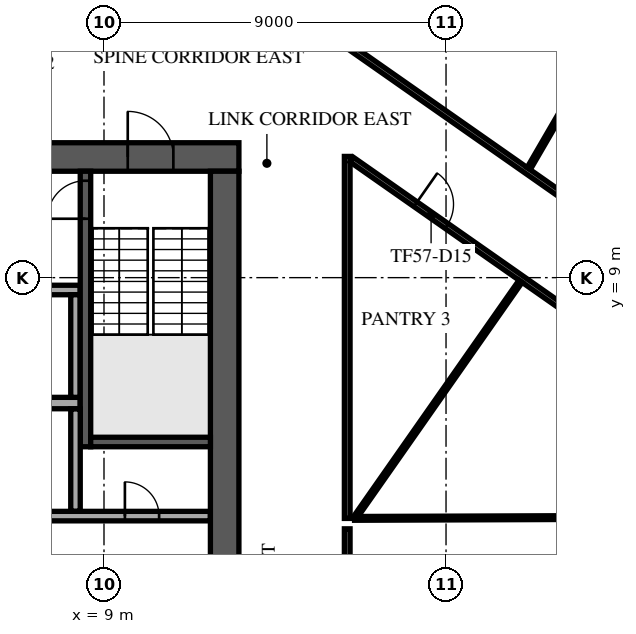
"""IFC4 building model, lengths in metres.
Left out: names, types, materials, properties, quantities, classifications, styles, units other than length and angle.
Written with IfcOpenShell. Run it as: python <this file> out.ifc"""

import sys

from ifc_helpers import new_model, si_unit, direction, frame, frame_2d, origin, place, context, subcontext, project, spatial, rectangle, extrude, element, fill, save


model = new_model("IFC4")
c1 = context("Model", 3, precision=1e-05, world=origin(), true_north=direction((0.0, 1.0)))
c2 = subcontext(c1, "Body", "Model", "MODEL_VIEW")
j1 = project(units=[si_unit("LENGTHUNIT", "METRE"), si_unit("PLANEANGLEUNIT", "RADIAN")], contexts=[c1])
p1 = place(None, origin())
s1 = spatial("IfcSite", under=j1, at=p1, CompositionType="ELEMENT")
p2 = place(p1, origin())
s2 = spatial("IfcBuilding", under=s1, at=p2, CompositionType="ELEMENT")
p3 = place(p2, frame((0.0, 0.0, 242.9)))
s3 = spatial("IfcBuildingStorey", under=s2, at=p3, CompositionType="ELEMENT", Elevation=242.9)
p4 = place(p3, frame((-12.55, 12.175, 0.0), z_axis=(0.0, 0.0, 1.0), x_axis=(1.0, 0.0, 0.0)))
e1 = element("IfcWall", 1, at=p4, inside=s3, PredefinedType="SHEAR", context=c2, shape_type="SweptSolid", body=[
    extrude(rectangle(XDim=25.1, YDim=0.75, at=frame_2d((12.55, 0.0))), origin(), (0.0, 0.0, 1.0), 3.64),
])
p5 = place(p4, frame((11.35, 0.0, 0.0)))
e2 = element("IfcOpeningElement", 2, at=p5, cuts=e1, PredefinedType="OPENING", context=c2, shape_type="SweptSolid", body=[
    extrude(rectangle(XDim=2.4, YDim=2.4, at=frame_2d((1.2, 1.2))), frame((0.0, 0.385, 0.0), z_axis=(0.0, -1.0, 0.0), x_axis=(1.0, 0.0, 0.0)), (0.0, 0.0, 1.0), 0.77),
])
p6 = place(p4, frame((22.175, 0.0, 0.0)))
e3 = element("IfcOpeningElement", 3, at=p6, cuts=e1, PredefinedType="OPENING", context=c2, shape_type="SweptSolid", body=[
    extrude(rectangle(XDim=1.2, YDim=2.1, at=frame_2d((0.6, 1.05))), frame((0.0, 0.385, 0.0), z_axis=(0.0, -1.0, 0.0), x_axis=(1.0, 0.0, 0.0)), (0.0, 0.0, 1.0), 0.77),
])
p7 = place(p4, frame((1.15, 0.0, 0.0)))
e4 = element("IfcOpeningElement", 4, at=p7, cuts=e1, PredefinedType="OPENING", context=c2, shape_type="SweptSolid", body=[
    extrude(rectangle(XDim=1.0, YDim=2.1, at=frame_2d((0.5, 1.05))), frame((0.0, 0.385, 0.0), z_axis=(0.0, -1.0, 0.0), x_axis=(1.0, 0.0, 0.0)), (0.0, 0.0, 1.0), 0.77),
])
p8 = place(p3, frame((12.175, -11.8, 0.0), z_axis=(0.0, 0.0, 1.0), x_axis=(0.0, 1.0, 0.0)))
e5 = element("IfcWall", 5, at=p8, inside=s3, PredefinedType="SHEAR", context=c2, shape_type="SweptSolid", body=[
    extrude(rectangle(XDim=23.6, YDim=0.75, at=frame_2d((11.8, 0.0))), origin(), (0.0, 0.0, 1.0), 3.64),
])
p9 = place(p8, frame((10.6, 0.0, 0.0)))
e6 = element("IfcOpeningElement", 6, at=p9, cuts=e5, PredefinedType="OPENING", context=c2, shape_type="SweptSolid", body=[
    extrude(rectangle(XDim=2.4, YDim=2.4, at=frame_2d((1.2, 1.2))), frame((0.0, 0.385, 0.0), z_axis=(0.0, -1.0, 0.0), x_axis=(1.0, 0.0, 0.0)), (0.0, 0.0, 1.0), 0.77),
])
p10 = place(p3, frame((-8.375, 5.7, 0.0), z_axis=(0.0, 0.0, 1.0), x_axis=(1.0, 0.0, 0.0)))
e7 = element("IfcWall", 7, at=p10, inside=s3, PredefinedType="SOLIDWALL", context=c2, shape_type="SweptSolid", body=[
    extrude(rectangle(XDim=16.75, YDim=0.3, at=frame_2d((8.375, 0.0))), origin(), (0.0, 0.0, 1.0), 3.64),
])
p11 = place(p3, frame((-8.375, 8.675, 0.0), z_axis=(0.0, 0.0, 1.0), x_axis=(1.0, 0.0, 0.0)))
e8 = element("IfcWall", 8, at=p11, inside=s3, PredefinedType="SOLIDWALL", context=c2, shape_type="SweptSolid", body=[
    extrude(rectangle(XDim=16.75, YDim=0.25, at=frame_2d((8.375, 0.0))), origin(), (0.0, 0.0, 1.0), 3.64),
])
p12 = place(p11, frame((0.9, 0.0, 0.0)))
e9 = element("IfcOpeningElement", 9, at=p12, cuts=e8, PredefinedType="OPENING", context=c2, shape_type="SweptSolid", body=[
    extrude(rectangle(XDim=1.2, YDim=2.1, at=frame_2d((0.6, 1.05))), frame((0.0, 0.135, 0.0), z_axis=(0.0, -1.0, 0.0), x_axis=(1.0, 0.0, 0.0)), (0.0, 0.0, 1.0), 0.27),
])
p13 = place(p11, frame((3.65, 0.0, 0.0)))
e10 = element("IfcOpeningElement", 10, at=p13, cuts=e8, PredefinedType="OPENING", context=c2, shape_type="SweptSolid", body=[
    extrude(rectangle(XDim=1.2, YDim=2.1, at=frame_2d((0.6, 1.05))), frame((0.0, 0.135, 0.0), z_axis=(0.0, -1.0, 0.0), x_axis=(1.0, 0.0, 0.0)), (0.0, 0.0, 1.0), 0.27),
])
p14 = place(p11, frame((6.4, 0.0, 0.0)))
e11 = element("IfcOpeningElement", 11, at=p14, cuts=e8, PredefinedType="OPENING", context=c2, shape_type="SweptSolid", body=[
    extrude(rectangle(XDim=1.2, YDim=2.1, at=frame_2d((0.6, 1.05))), frame((0.0, 0.135, 0.0), z_axis=(0.0, -1.0, 0.0), x_axis=(1.0, 0.0, 0.0)), (0.0, 0.0, 1.0), 0.27),
])
p15 = place(p11, frame((9.15, 0.0, 0.0)))
e12 = element("IfcOpeningElement", 12, at=p15, cuts=e8, PredefinedType="OPENING", context=c2, shape_type="SweptSolid", body=[
    extrude(rectangle(XDim=1.2, YDim=2.1, at=frame_2d((0.6, 1.05))), frame((0.0, 0.135, 0.0), z_axis=(0.0, -1.0, 0.0), x_axis=(1.0, 0.0, 0.0)), (0.0, 0.0, 1.0), 0.27),
])
p16 = place(p11, frame((11.9, 0.0, 0.0)))
e13 = element("IfcOpeningElement", 13, at=p16, cuts=e8, PredefinedType="OPENING", context=c2, shape_type="SweptSolid", body=[
    extrude(rectangle(XDim=1.2, YDim=2.1, at=frame_2d((0.6, 1.05))), frame((0.0, 0.135, 0.0), z_axis=(0.0, -1.0, 0.0), x_axis=(1.0, 0.0, 0.0)), (0.0, 0.0, 1.0), 0.27),
])
p17 = place(p11, frame((14.65, 0.0, 0.0)))
e14 = element("IfcOpeningElement", 14, at=p17, cuts=e8, PredefinedType="OPENING", context=c2, shape_type="SweptSolid", body=[
    extrude(rectangle(XDim=1.2, YDim=2.1, at=frame_2d((0.6, 1.05))), frame((0.0, 0.135, 0.0), z_axis=(0.0, -1.0, 0.0), x_axis=(1.0, 0.0, 0.0)), (0.0, 0.0, 1.0), 0.27),
])
p18 = place(p3, frame((8.25, 5.85, 0.0), z_axis=(0.0, 0.0, 1.0), x_axis=(0.0, 1.0, 0.0)))
e15 = element("IfcWall", 15, at=p18, inside=s3, PredefinedType="SOLIDWALL", context=c2, shape_type="SweptSolid", body=[
    extrude(rectangle(XDim=2.7, YDim=0.25, at=frame_2d((1.35, 0.0))), origin(), (0.0, 0.0, 1.0), 3.64),
])
p19 = place(p3, frame((8.512, 4.55, 0.0), z_axis=(0.0, 0.0, 1.0), x_axis=(0.0, 1.0, 0.0)))
e16 = element("IfcWall", 16, at=p19, inside=s3, PredefinedType="SOLIDWALL", context=c2, shape_type="SweptSolid", body=[
    extrude(rectangle(XDim=7.25, YDim=0.275, at=frame_2d((3.625, 0.0))), origin(), (0.0, 0.0, 1.0), 3.64),
])
p20 = place(p19, frame((6.0, 0.0, 0.0)))
e17 = element("IfcOpeningElement", 17, at=p20, cuts=e16, PredefinedType="OPENING", context=c2, shape_type="SweptSolid", body=[
    extrude(rectangle(XDim=1.0, YDim=2.1, at=frame_2d((0.5, 1.05))), frame((0.0, 0.147, 0.0), z_axis=(0.0, -1.0, 0.0), x_axis=(1.0, 0.0, 0.0)), (0.0, 0.0, 1.0), 0.295),
])
p21 = place(p3, frame((8.65, 4.675, 0.0), z_axis=(0.0, 0.0, 1.0), x_axis=(1.0, 0.0, 0.0)))
e18 = element("IfcWall", 18, at=p21, inside=s3, PredefinedType="SOLIDWALL", context=c2, shape_type="SweptSolid", body=[
    extrude(rectangle(XDim=3.15, YDim=0.25, at=frame_2d((1.575, 0.0))), origin(), (0.0, 0.0, 1.0), 3.64),
])
p22 = place(p3, frame((-11.795, 2.725, 0.0), z_axis=(0.0, 0.0, 1.0), x_axis=(1.0, 0.0, 0.0)))
e19 = element("IfcWall", 19, at=p22, inside=s3, PredefinedType="PARTITIONING", context=c2, shape_type="SweptSolid", body=[
    extrude(rectangle(XDim=23.59, YDim=0.25, at=frame_2d((11.795, 0.0))), origin(), (0.0, 0.0, 1.0), 3.64),
])
p23 = place(p22, frame((21.345, 0.0, 0.0)))
e20 = element("IfcOpeningElement", 20, at=p23, cuts=e19, PredefinedType="OPENING", context=c2, shape_type="SweptSolid", body=[
    extrude(rectangle(XDim=0.9, YDim=2.1, at=frame_2d((0.45, 1.05))), frame((0.0, 0.135, 0.0), z_axis=(0.0, -1.0, 0.0), x_axis=(1.0, 0.0, 0.0)), (0.0, 0.0, 1.0), 0.27),
])
p24 = place(p22, frame((1.345, 0.0, 0.0)))
e21 = element("IfcOpeningElement", 21, at=p24, cuts=e19, PredefinedType="OPENING", context=c2, shape_type="SweptSolid", body=[
    extrude(rectangle(XDim=0.9, YDim=2.1, at=frame_2d((0.45, 1.05))), frame((0.0, 0.135, 0.0), z_axis=(0.0, -1.0, 0.0), x_axis=(1.0, 0.0, 0.0)), (0.0, 0.0, 1.0), 0.27),
])
p25 = place(p22, frame((4.42, 0.0, 0.0)))
e22 = element("IfcOpeningElement", 22, at=p25, cuts=e19, PredefinedType="OPENING", context=c2, shape_type="SweptSolid", body=[
    extrude(rectangle(XDim=1.0, YDim=2.1, at=frame_2d((0.5, 1.05))), frame((0.0, 0.135, 0.0), z_axis=(0.0, -1.0, 0.0), x_axis=(1.0, 0.0, 0.0)), (0.0, 0.0, 1.0), 0.27),
])
p26 = place(p22, frame((7.17, 0.0, 0.0)))
e23 = element("IfcOpeningElement", 23, at=p26, cuts=e19, PredefinedType="OPENING", context=c2, shape_type="SweptSolid", body=[
    extrude(rectangle(XDim=1.0, YDim=2.1, at=frame_2d((0.5, 1.05))), frame((0.0, 0.135, 0.0), z_axis=(0.0, -1.0, 0.0), x_axis=(1.0, 0.0, 0.0)), (0.0, 0.0, 1.0), 0.27),
])
p27 = place(p22, frame((12.57, 0.0, 0.0)))
e24 = element("IfcOpeningElement", 24, at=p27, cuts=e19, PredefinedType="OPENING", context=c2, shape_type="SweptSolid", body=[
    extrude(rectangle(XDim=1.2, YDim=2.1, at=frame_2d((0.6, 1.05))), frame((0.0, 0.135, 0.0), z_axis=(0.0, -1.0, 0.0), x_axis=(1.0, 0.0, 0.0)), (0.0, 0.0, 1.0), 0.27),
])
p28 = place(p3, frame((8.25, 2.855, 0.0), z_axis=(0.0, 0.0, 1.0), x_axis=(0.0, 1.0, 0.0)))
e25 = element("IfcWall", 25, at=p28, inside=s3, PredefinedType="PARTITIONING", context=c2, shape_type="SweptSolid", body=[
    extrude(rectangle(XDim=2.69, YDim=0.25, at=frame_2d((1.345, 0.0))), origin(), (0.0, 0.0, 1.0), 3.64),
])
p29 = place(p3, frame((5.206, -33.362, 0.0), z_axis=(0.0, 0.0, 1.0), x_axis=(0.573577438409, 0.81915134264, 0.0)))
e26 = element("IfcWall", 26, at=p29, inside=s3, PredefinedType="STANDARD", context=c2, shape_type="SweptSolid", body=[
    extrude(rectangle(XDim=48.686, YDim=0.6, at=frame_2d((24.343, 0.0))), origin(), (0.0, 0.0, 1.0), 3.64),
])
p30 = place(p29, frame((1.213, 0.0, 0.9)))
e27 = element("IfcOpeningElement", 27, at=p30, cuts=e26, PredefinedType="OPENING", context=c2, shape_type="SweptSolid", body=[
    extrude(rectangle(XDim=2.0, YDim=2.1, at=frame_2d((1.0, 1.05))), frame((0.0, 0.31, 0.0), z_axis=(0.0, -1.0, 0.0), x_axis=(1.0, 0.0, 0.0)), (0.0, 0.0, 1.0), 0.62),
])
p31 = place(p29, frame((5.639, 0.0, 0.9)))
e28 = element("IfcOpeningElement", 28, at=p31, cuts=e26, PredefinedType="OPENING", context=c2, shape_type="SweptSolid", body=[
    extrude(rectangle(XDim=2.0, YDim=2.1, at=frame_2d((1.0, 1.05))), frame((0.0, 0.31, 0.0), z_axis=(0.0, -1.0, 0.0), x_axis=(1.0, 0.0, 0.0)), (0.0, 0.0, 1.0), 0.62),
])
p32 = place(p29, frame((10.065, 0.0, 0.9)))
e29 = element("IfcOpeningElement", 29, at=p32, cuts=e26, PredefinedType="OPENING", context=c2, shape_type="SweptSolid", body=[
    extrude(rectangle(XDim=2.0, YDim=2.1, at=frame_2d((1.0, 1.05))), frame((0.0, 0.31, 0.0), z_axis=(0.0, -1.0, 0.0), x_axis=(1.0, 0.0, 0.0)), (0.0, 0.0, 1.0), 0.62),
])
p33 = place(p29, frame((14.491, 0.0, 0.9)))
e30 = element("IfcOpeningElement", 30, at=p33, cuts=e26, PredefinedType="OPENING", context=c2, shape_type="SweptSolid", body=[
    extrude(rectangle(XDim=2.0, YDim=2.1, at=frame_2d((1.0, 1.05))), frame((0.0, 0.31, 0.0), z_axis=(0.0, -1.0, 0.0), x_axis=(1.0, 0.0, 0.0)), (0.0, 0.0, 1.0), 0.62),
])
p34 = place(p29, frame((18.917, 0.0, 0.9)))
e31 = element("IfcOpeningElement", 31, at=p34, cuts=e26, PredefinedType="OPENING", context=c2, shape_type="SweptSolid", body=[
    extrude(rectangle(XDim=2.0, YDim=2.1, at=frame_2d((1.0, 1.05))), frame((0.0, 0.31, 0.0), z_axis=(0.0, -1.0, 0.0), x_axis=(1.0, 0.0, 0.0)), (0.0, 0.0, 1.0), 0.62),
])
p35 = place(p29, frame((23.343, 0.0, 0.9)))
e32 = element("IfcOpeningElement", 32, at=p35, cuts=e26, PredefinedType="OPENING", context=c2, shape_type="SweptSolid", body=[
    extrude(rectangle(XDim=2.0, YDim=2.1, at=frame_2d((1.0, 1.05))), frame((0.0, 0.31, 0.0), z_axis=(0.0, -1.0, 0.0), x_axis=(1.0, 0.0, 0.0)), (0.0, 0.0, 1.0), 0.62),
])
p36 = place(p29, frame((27.769, 0.0, 0.9)))
e33 = element("IfcOpeningElement", 33, at=p36, cuts=e26, PredefinedType="OPENING", context=c2, shape_type="SweptSolid", body=[
    extrude(rectangle(XDim=2.0, YDim=2.1, at=frame_2d((1.0, 1.05))), frame((0.0, 0.31, 0.0), z_axis=(0.0, -1.0, 0.0), x_axis=(1.0, 0.0, 0.0)), (0.0, 0.0, 1.0), 0.62),
])
p37 = place(p29, frame((32.195, 0.0, 0.9)))
e34 = element("IfcOpeningElement", 34, at=p37, cuts=e26, PredefinedType="OPENING", context=c2, shape_type="SweptSolid", body=[
    extrude(rectangle(XDim=2.0, YDim=2.1, at=frame_2d((1.0, 1.05))), frame((0.0, 0.31, 0.0), z_axis=(0.0, -1.0, 0.0), x_axis=(1.0, 0.0, 0.0)), (0.0, 0.0, 1.0), 0.62),
])
p38 = place(p29, frame((36.621, 0.0, 0.9)))
e35 = element("IfcOpeningElement", 35, at=p38, cuts=e26, PredefinedType="OPENING", context=c2, shape_type="SweptSolid", body=[
    extrude(rectangle(XDim=2.0, YDim=2.1, at=frame_2d((1.0, 1.05))), frame((0.0, 0.31, 0.0), z_axis=(0.0, -1.0, 0.0), x_axis=(1.0, 0.0, 0.0)), (0.0, 0.0, 1.0), 0.62),
])
p39 = place(p29, frame((41.047, 0.0, 0.9)))
e36 = element("IfcOpeningElement", 36, at=p39, cuts=e26, PredefinedType="OPENING", context=c2, shape_type="SweptSolid", body=[
    extrude(rectangle(XDim=2.0, YDim=2.1, at=frame_2d((1.0, 1.05))), frame((0.0, 0.31, 0.0), z_axis=(0.0, -1.0, 0.0), x_axis=(1.0, 0.0, 0.0)), (0.0, 0.0, 1.0), 0.62),
])
p40 = place(p29, frame((45.473, 0.0, 0.9)))
e37 = element("IfcOpeningElement", 37, at=p40, cuts=e26, PredefinedType="OPENING", context=c2, shape_type="SweptSolid", body=[
    extrude(rectangle(XDim=2.0, YDim=2.1, at=frame_2d((1.0, 1.05))), frame((0.0, 0.31, 0.0), z_axis=(0.0, -1.0, 0.0), x_axis=(1.0, 0.0, 0.0)), (0.0, 0.0, 1.0), 0.62),
])
p41 = place(p3, frame((31.815, 13.98, 0.0), z_axis=(0.0, 0.0, 1.0), x_axis=(-0.819152162902, 0.573576266955, 0.0)))
e38 = element("IfcWall", 38, at=p41, inside=s3, PredefinedType="STANDARD", context=c2, shape_type="SweptSolid", body=[
    extrude(rectangle(XDim=36.243, YDim=0.6, at=frame_2d((18.122, 0.0))), origin(), (0.0, 0.0, 1.0), 3.64),
])
p42 = place(p41, frame((1.215, 0.0, 0.9)))
e39 = element("IfcOpeningElement", 39, at=p42, cuts=e38, PredefinedType="OPENING", context=c2, shape_type="SweptSolid", body=[
    extrude(rectangle(XDim=2.1, YDim=2.1, at=frame_2d((1.05, 1.05))), frame((0.0, 0.31, 0.0), z_axis=(0.0, -1.0, 0.0), x_axis=(1.0, 0.0, 0.0)), (0.0, 0.0, 1.0), 0.62),
])
p43 = place(p41, frame((5.746, 0.0, 0.9)))
e40 = element("IfcOpeningElement", 40, at=p43, cuts=e38, PredefinedType="OPENING", context=c2, shape_type="SweptSolid", body=[
    extrude(rectangle(XDim=2.1, YDim=2.1, at=frame_2d((1.05, 1.05))), frame((0.0, 0.31, 0.0), z_axis=(0.0, -1.0, 0.0), x_axis=(1.0, 0.0, 0.0)), (0.0, 0.0, 1.0), 0.62),
])
p44 = place(p41, frame((10.276, 0.0, 0.9)))
e41 = element("IfcOpeningElement", 41, at=p44, cuts=e38, PredefinedType="OPENING", context=c2, shape_type="SweptSolid", body=[
    extrude(rectangle(XDim=2.1, YDim=2.1, at=frame_2d((1.05, 1.05))), frame((0.0, 0.31, 0.0), z_axis=(0.0, -1.0, 0.0), x_axis=(1.0, 0.0, 0.0)), (0.0, 0.0, 1.0), 0.62),
])
p45 = place(p41, frame((14.806, 0.0, 0.9)))
e42 = element("IfcOpeningElement", 42, at=p45, cuts=e38, PredefinedType="OPENING", context=c2, shape_type="SweptSolid", body=[
    extrude(rectangle(XDim=2.1, YDim=2.1, at=frame_2d((1.05, 1.05))), frame((0.0, 0.31, 0.0), z_axis=(0.0, -1.0, 0.0), x_axis=(1.0, 0.0, 0.0)), (0.0, 0.0, 1.0), 0.62),
])
p46 = place(p41, frame((19.337, 0.0, 0.9)))
e43 = element("IfcOpeningElement", 43, at=p46, cuts=e38, PredefinedType="OPENING", context=c2, shape_type="SweptSolid", body=[
    extrude(rectangle(XDim=2.1, YDim=2.1, at=frame_2d((1.05, 1.05))), frame((0.0, 0.31, 0.0), z_axis=(0.0, -1.0, 0.0), x_axis=(1.0, 0.0, 0.0)), (0.0, 0.0, 1.0), 0.62),
])
p47 = place(p41, frame((23.867, 0.0, 0.9)))
e44 = element("IfcOpeningElement", 44, at=p47, cuts=e38, PredefinedType="OPENING", context=c2, shape_type="SweptSolid", body=[
    extrude(rectangle(XDim=2.1, YDim=2.1, at=frame_2d((1.05, 1.05))), frame((0.0, 0.31, 0.0), z_axis=(0.0, -1.0, 0.0), x_axis=(1.0, 0.0, 0.0)), (0.0, 0.0, 1.0), 0.62),
])
p48 = place(p41, frame((28.398, 0.0, 0.9)))
e45 = element("IfcOpeningElement", 45, at=p48, cuts=e38, PredefinedType="OPENING", context=c2, shape_type="SweptSolid", body=[
    extrude(rectangle(XDim=2.1, YDim=2.1, at=frame_2d((1.05, 1.05))), frame((0.0, 0.31, 0.0), z_axis=(0.0, -1.0, 0.0), x_axis=(1.0, 0.0, 0.0)), (0.0, 0.0, 1.0), 0.62),
])
p49 = place(p41, frame((32.928, 0.0, 0.9)))
e46 = element("IfcOpeningElement", 46, at=p49, cuts=e38, PredefinedType="OPENING", context=c2, shape_type="SweptSolid", body=[
    extrude(rectangle(XDim=2.1, YDim=2.1, at=frame_2d((1.05, 1.05))), frame((0.0, 0.31, 0.0), z_axis=(0.0, -1.0, 0.0), x_axis=(1.0, 0.0, 0.0)), (0.0, 0.0, 1.0), 0.62),
])
p50 = place(p3, frame((-1.89, 27.226, 0.0), z_axis=(0.0, 0.0, 1.0), x_axis=(0.819163235761, -0.573560452941, 0.0)))
e47 = element("IfcWall", 47, at=p50, inside=s3, PredefinedType="PARTITIONING", context=c2, shape_type="SweptSolid", body=[
    extrude(rectangle(XDim=34.403, YDim=0.15, at=frame_2d((17.202, 0.0))), origin(), (0.0, 0.0, 1.0), 3.24),
])
p51 = place(p50, frame((7.427, 0.0, 0.0)))
e48 = element("IfcOpeningElement", 48, at=p51, cuts=e47, PredefinedType="OPENING", context=c2, shape_type="SweptSolid", body=[
    extrude(rectangle(XDim=1.0, YDim=2.1, at=frame_2d((0.5, 1.05))), frame((0.0, 0.085, 0.0), z_axis=(0.0, -1.0, 0.0), x_axis=(1.0, 0.0, 0.0)), (0.0, 0.0, 1.0), 0.17),
])
p52 = place(p50, frame((15.173, 0.0, 0.0)))
e49 = element("IfcOpeningElement", 49, at=p52, cuts=e47, PredefinedType="OPENING", context=c2, shape_type="SweptSolid", body=[
    extrude(rectangle(XDim=1.0, YDim=2.1, at=frame_2d((0.5, 1.05))), frame((0.0, 0.085, 0.0), z_axis=(0.0, -1.0, 0.0), x_axis=(1.0, 0.0, 0.0)), (0.0, 0.0, 1.0), 0.17),
])
p53 = place(p50, frame((19.273, 0.0, 0.0)))
e50 = element("IfcOpeningElement", 50, at=p53, cuts=e47, PredefinedType="OPENING", context=c2, shape_type="SweptSolid", body=[
    extrude(rectangle(XDim=1.0, YDim=2.1, at=frame_2d((0.5, 1.05))), frame((0.0, 0.085, 0.0), z_axis=(0.0, -1.0, 0.0), x_axis=(1.0, 0.0, 0.0)), (0.0, 0.0, 1.0), 0.17),
])
p54 = place(p3, frame((15.4, -15.325, 0.0), z_axis=(0.0, 0.0, 1.0), x_axis=(0.0, 1.0, 0.0)))
e51 = element("IfcWall", 51, at=p54, inside=s3, PredefinedType="PARTITIONING", context=c2, shape_type="SweptSolid", body=[
    extrude(rectangle(XDim=17.715, YDim=0.15, at=frame_2d((8.857, 0.0))), origin(), (0.0, 0.0, 1.0), 3.24),
])
p55 = place(p54, frame((7.812, 0.0, 0.0)))
e52 = element("IfcOpeningElement", 52, at=p55, cuts=e51, PredefinedType="OPENING", context=c2, shape_type="SweptSolid", body=[
    extrude(rectangle(XDim=1.0, YDim=2.1, at=frame_2d((0.5, 1.05))), frame((0.0, 0.085, 0.0), z_axis=(0.0, -1.0, 0.0), x_axis=(1.0, 0.0, 0.0)), (0.0, 0.0, 1.0), 0.17),
])
p56 = place(p54, frame((15.123, 0.0, 0.0)))
e53 = element("IfcOpeningElement", 53, at=p56, cuts=e51, PredefinedType="OPENING", context=c2, shape_type="SweptSolid", body=[
    extrude(rectangle(XDim=1.0, YDim=2.1, at=frame_2d((0.5, 1.05))), frame((0.0, 0.085, 0.0), z_axis=(0.0, -1.0, 0.0), x_axis=(1.0, 0.0, 0.0)), (0.0, 0.0, 1.0), 0.17),
])
p57 = place(p3, frame((15.4, 2.664, 0.0), z_axis=(0.0, 0.0, 1.0), x_axis=(0.0, 1.0, 0.0)))
e54 = element("IfcWall", 54, at=p57, inside=s3, PredefinedType="PARTITIONING", context=c2, shape_type="SweptSolid", body=[
    extrude(rectangle(XDim=9.526, YDim=0.15, at=frame_2d((4.763, 0.0))), origin(), (0.0, 0.0, 1.0), 3.24),
])
p58 = place(p3, frame((15.518, 12.107, 0.0), z_axis=(0.0, 0.0, 1.0), x_axis=(0.819171924474, -0.573548043457, 0.0)))
e55 = element("IfcWall", 55, at=p58, inside=s3, PredefinedType="PARTITIONING", context=c2, shape_type="SweptSolid", body=[
    extrude(rectangle(XDim=11.471, YDim=0.15, at=frame_2d((5.736, 0.0))), origin(), (0.0, 0.0, 1.0), 3.24),
])
p59 = place(p58, frame((2.05, 0.0, 0.0)))
e56 = element("IfcOpeningElement", 56, at=p59, cuts=e55, PredefinedType="OPENING", context=c2, shape_type="SweptSolid", body=[
    extrude(rectangle(XDim=1.0, YDim=2.1, at=frame_2d((0.5, 1.05))), frame((0.0, 0.085, 0.0), z_axis=(0.0, -1.0, 0.0), x_axis=(1.0, 0.0, 0.0)), (0.0, 0.0, 1.0), 0.17),
])
p60 = place(p58, frame((10.027, 0.0, 0.0)))
e57 = element("IfcOpeningElement", 57, at=p60, cuts=e55, PredefinedType="OPENING", context=c2, shape_type="SweptSolid", body=[
    extrude(rectangle(XDim=1.0, YDim=2.1, at=frame_2d((0.5, 1.05))), frame((0.0, 0.085, 0.0), z_axis=(0.0, -1.0, 0.0), x_axis=(1.0, 0.0, 0.0)), (0.0, 0.0, 1.0), 0.17),
])
p61 = place(p3, frame((15.593, 2.665, 0.0), z_axis=(0.0, 0.0, 1.0), x_axis=(0.999993270933, 0.003668526741, 0.0)))
e58 = element("IfcWall", 58, at=p61, inside=s3, PredefinedType="PARTITIONING", context=c2, shape_type="SweptSolid", body=[
    extrude(rectangle(XDim=14.508, YDim=0.1, at=frame_2d((7.254, 0.0))), origin(), (0.0, 0.0, 1.0), 3.64),
])
p62 = place(p3, frame((15.648, 2.744, 0.0), z_axis=(0.0, 0.0, 1.0), x_axis=(0.57357562998, 0.819152608915, 0.0)))
e59 = element("IfcWall", 59, at=p62, inside=s3, PredefinedType="PARTITIONING", context=c2, shape_type="SweptSolid", body=[
    extrude(rectangle(XDim=7.521, YDim=0.1, at=frame_2d((3.76, 0.0))), origin(), (0.0, 0.0, 1.0), 3.24),
])
p63 = place(p3, frame((20.177, 11.873, 0.0), z_axis=(0.0, 0.0, 1.0), x_axis=(0.502475319919, 0.864591552626, 0.0)))
e60 = element("IfcWall", 60, at=p63, inside=s3, PredefinedType="PARTITIONING", context=c2, shape_type="SweptSolid", body=[
    extrude(rectangle(XDim=8.128, YDim=0.1, at=frame_2d((4.064, 0.0))), origin(), (0.0, 0.0, 1.0), 3.24),
])
p64 = place(p6, origin())
e61 = element("IfcDoor", 61, at=p64, inside=s3, OperationType="SINGLE_SWING_LEFT", PredefinedType="DOOR", context=c2, shape_type="SweptSolid", body=[
    extrude(rectangle(XDim=1.2, YDim=2.1, at=frame_2d((0.6, 1.05))), frame((0.0, 0.025, 0.0), z_axis=(0.0, -1.0, 0.0), x_axis=(1.0, 0.0, 0.0)), (0.0, 0.0, 1.0), 0.05),
])
fill(e3, e61)
p65 = place(p20, origin())
e62 = element("IfcDoor", 62, at=p65, inside=s3, OperationType="SINGLE_SWING_LEFT", PredefinedType="DOOR", context=c2, shape_type="SweptSolid", body=[
    extrude(rectangle(XDim=1.0, YDim=2.1, at=frame_2d((0.5, 1.05))), frame((0.0, 0.025, 0.0), z_axis=(0.0, -1.0, 0.0), x_axis=(1.0, 0.0, 0.0)), (0.0, 0.0, 1.0), 0.05),
])
fill(e17, e62)
p66 = place(p23, origin())
e63 = element("IfcDoor", 63, at=p66, inside=s3, OperationType="SINGLE_SWING_RIGHT", PredefinedType="DOOR", context=c2, shape_type="SweptSolid", body=[
    extrude(rectangle(XDim=0.9, YDim=2.1, at=frame_2d((0.45, 1.05))), frame((0.0, 0.025, 0.0), z_axis=(0.0, -1.0, 0.0), x_axis=(1.0, 0.0, 0.0)), (0.0, 0.0, 1.0), 0.05),
])
fill(e20, e63)
p67 = place(p59, frame((1.0, 0.0, 0.0), z_axis=(0.0, 0.0, 1.0), x_axis=(-1.0, 0.0, 0.0)))
e64 = element("IfcDoor", 64, at=p67, inside=s3, OperationType="SINGLE_SWING_LEFT", PredefinedType="DOOR", context=c2, shape_type="SweptSolid", body=[
    extrude(rectangle(XDim=1.0, YDim=2.1, at=frame_2d((0.5, 1.05))), frame((0.0, 0.025, 0.0), z_axis=(0.0, -1.0, 0.0), x_axis=(1.0, 0.0, 0.0)), (0.0, 0.0, 1.0), 0.05),
])
fill(e56, e64)
save(model, sys.argv[1])
